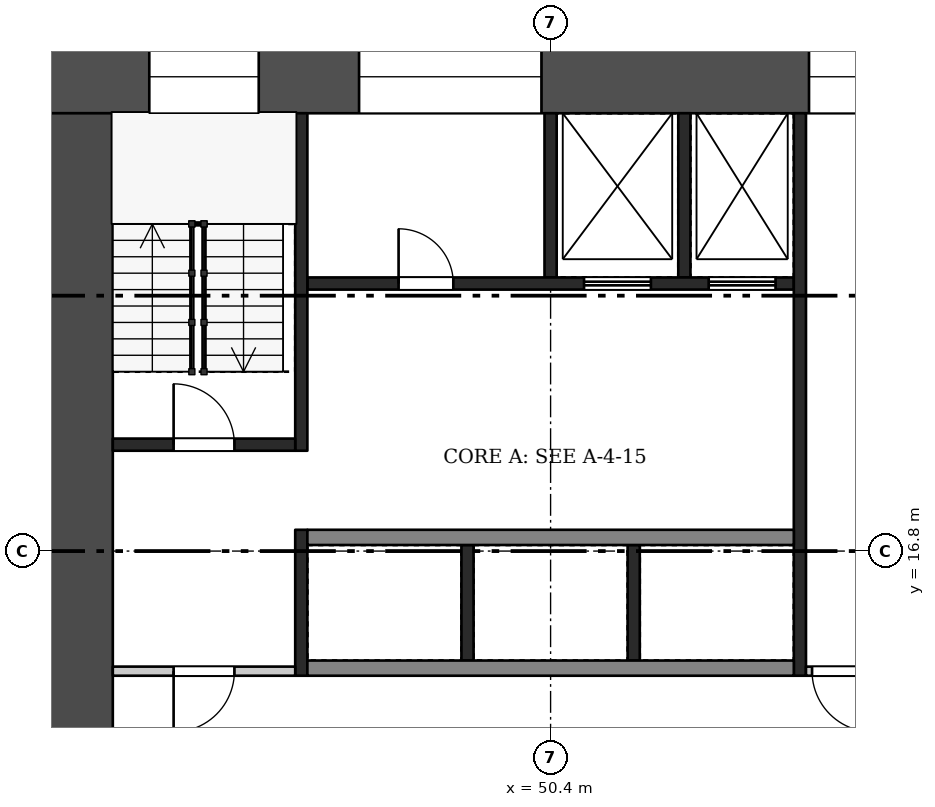
"""IFC4 building model, lengths in metres.
Left out: names, types, materials, properties, quantities, classifications, styles, units other than length and angle.
Written with IfcOpenShell. Run it as: python <this file> out.ifc"""

import sys

from ifc_helpers import new_model, si_unit, direction, frame, frame_2d, origin, place, context, subcontext, project, spatial, rectangle, extrude, element, fill, save


model = new_model("IFC4")
c1 = context("Model", 3, precision=1e-05, world=origin(), true_north=direction((0.0, 1.0)))
c2 = subcontext(c1, "Body", "Model", "MODEL_VIEW")
j1 = project(units=[si_unit("LENGTHUNIT", "METRE"), si_unit("PLANEANGLEUNIT", "RADIAN")], contexts=[c1])
p1 = place(None, origin())
s1 = spatial("IfcSite", under=j1, at=p1, CompositionType="ELEMENT")
p2 = place(p1, origin())
s2 = spatial("IfcBuilding", under=s1, at=p2, CompositionType="ELEMENT")
p3 = place(p2, frame((0.0, 0.0, 81.2)))
s3 = spatial("IfcBuildingStorey", under=s2, at=p3, CompositionType="ELEMENT", Elevation=81.2)
p4 = place(p3, frame((42.0, 24.6, 0.0), z_axis=(0.0, 0.0, 1.0), x_axis=(1.0, 0.0, 0.0)))
e1 = element("IfcWall", 1, at=p4, inside=s3, PredefinedType="SHEAR", context=c2, shape_type="SweptSolid", body=[
    extrude(rectangle(XDim=16.8, YDim=1.2, at=frame_2d((8.4, 0.0))), origin(), (0.0, 0.0, 1.0), 3.22),
])
p5 = place(p4, frame((1.8, 0.0, 0.5)))
e2 = element("IfcOpeningElement", 2, at=p5, cuts=e1, PredefinedType="OPENING", context=c2, shape_type="SweptSolid", body=[
    extrude(rectangle(XDim=1.8, YDim=2.4, at=frame_2d((0.9, 1.2))), frame((0.0, 0.61, 0.0), z_axis=(0.0, -1.0, 0.0), x_axis=(1.0, 0.0, 0.0)), (0.0, 0.0, 1.0), 1.22),
])
p6 = place(p4, frame((5.25, 0.0, 1.6)))
e3 = element("IfcOpeningElement", 3, at=p6, cuts=e1, PredefinedType="OPENING", context=c2, shape_type="SweptSolid", body=[
    extrude(rectangle(XDim=3.0, YDim=1.2, at=frame_2d((1.5, 0.6))), frame((0.0, 0.61, 0.0), z_axis=(0.0, -1.0, 0.0), x_axis=(1.0, 0.0, 0.0)), (0.0, 0.0, 1.0), 1.22),
])
p7 = place(p4, frame((12.65, 0.0, 0.6)))
e4 = element("IfcOpeningElement", 4, at=p7, cuts=e1, PredefinedType="OPENING", context=c2, shape_type="SweptSolid", body=[
    extrude(rectangle(XDim=1.0, YDim=2.1, at=frame_2d((0.5, 1.05))), frame((0.0, 0.61, 0.0), z_axis=(0.0, -1.0, 0.0), x_axis=(1.0, 0.0, 0.0)), (0.0, 0.0, 1.0), 1.22),
])
p8 = place(p4, frame((14.175, 0.0, 1.6)))
e5 = element("IfcOpeningElement", 5, at=p8, cuts=e1, PredefinedType="OPENING", context=c2, shape_type="SweptSolid", body=[
    extrude(rectangle(XDim=1.2, YDim=1.2, at=frame_2d((0.6, 0.6))), frame((0.0, 0.61, 0.0), z_axis=(0.0, -1.0, 0.0), x_axis=(1.0, 0.0, 0.0)), (0.0, 0.0, 1.0), 1.22),
])
p9 = place(p3, frame((42.6, 9.6, 0.0), z_axis=(0.0, 0.0, 1.0), x_axis=(0.0, 1.0, 0.0)))
e6 = element("IfcWall", 6, at=p9, inside=s3, PredefinedType="SHEAR", context=c2, shape_type="SweptSolid", body=[
    extrude(rectangle(XDim=14.4, YDim=1.2, at=frame_2d((7.2, 0.0))), origin(), (0.0, 0.0, 1.0), 3.22),
])
p10 = place(p9, frame((2.1, 0.0, 0.0)))
e7 = element("IfcOpeningElement", 7, at=p10, cuts=e6, PredefinedType="OPENING", context=c2, shape_type="SweptSolid", body=[
    extrude(rectangle(XDim=1.8, YDim=2.1, at=frame_2d((0.9, 1.05))), frame((0.0, 0.61, 0.0), z_axis=(0.0, -1.0, 0.0), x_axis=(1.0, 0.0, 0.0)), (0.0, 0.0, 1.0), 1.22),
])
for number, where, z_axis, x_axis in (
    (8, (49.033, 15.0, 0.0), (0.0, 0.0, 1.0), (0.0, 1.0, 0.0)),
    (9, (51.767, 15.0, 0.0), (0.0, 0.0, 1.0), (0.0, 1.0, 0.0)),
):
    element("IfcWall", number, at=place(p3, frame(where, z_axis=z_axis, x_axis=x_axis)), inside=s3, PredefinedType="SHEAR", context=c2, shape_type="SweptSolid", body=[
        extrude(rectangle(XDim=1.9, YDim=0.2, at=frame_2d((0.95, 0.0))), origin(), (0.0, 0.0, 1.0), 3.22),
    ])
for number, where, z_axis, x_axis in (
    (10, (46.4, 14.875, 0.0), (0.0, 0.0, 1.0), (1.0, 0.0, 0.0)),
    (11, (46.4, 17.025, 0.0), (0.0, 0.0, 1.0), (1.0, 0.0, 0.0)),
):
    element("IfcWall", number, at=place(p3, frame(where, z_axis=z_axis, x_axis=x_axis)), inside=s3, PredefinedType="SHEAR", context=c2, shape_type="SweptSolid", body=[
        extrude(rectangle(XDim=8.0, YDim=0.25, at=frame_2d((4.0, 0.0))), origin(), (0.0, 0.0, 1.0), 3.22),
    ])
for number, where, z_axis, x_axis in (
    (12, (50.4, 21.3, 0.0), (0.0, 0.0, 1.0), (0.0, 1.0, 0.0)),
    (13, (52.6, 21.3, 0.0), (0.0, 0.0, 1.0), (0.0, 1.0, 0.0)),
):
    element("IfcWall", number, at=place(p3, frame(where, z_axis=z_axis, x_axis=x_axis)), inside=s3, PredefinedType="SHEAR", context=c2, shape_type="SweptSolid", body=[
        extrude(rectangle(XDim=2.7, YDim=0.2, at=frame_2d((1.35, 0.0))), origin(), (0.0, 0.0, 1.0), 3.22),
    ])
p11 = place(p3, frame((46.4, 21.2, 0.0), z_axis=(0.0, 0.0, 1.0), x_axis=(1.0, 0.0, 0.0)))
e14 = element("IfcWall", 14, at=p11, inside=s3, PredefinedType="SHEAR", context=c2, shape_type="SweptSolid", body=[
    extrude(rectangle(XDim=8.0, YDim=0.2, at=frame_2d((4.0, 0.0))), origin(), (0.0, 0.0, 1.0), 3.22),
])
p12 = place(p11, frame((1.5, 0.0, 0.0)))
e15 = element("IfcOpeningElement", 15, at=p12, cuts=e14, PredefinedType="OPENING", context=c2, shape_type="SweptSolid", body=[
    extrude(rectangle(XDim=0.9, YDim=2.1, at=frame_2d((0.45, 1.05))), frame((0.0, 0.11, 0.0), z_axis=(0.0, -1.0, 0.0), x_axis=(1.0, 0.0, 0.0)), (0.0, 0.0, 1.0), 0.22),
])
p13 = place(p11, frame((4.55, 0.0, 0.0)))
e16 = element("IfcOpeningElement", 16, at=p13, cuts=e14, PredefinedType="OPENING", context=c2, shape_type="SweptSolid", body=[
    extrude(rectangle(XDim=1.1, YDim=2.1, at=frame_2d((0.55, 1.05))), frame((0.0, 0.11, 0.0), z_axis=(0.0, -1.0, 0.0), x_axis=(1.0, 0.0, 0.0)), (0.0, 0.0, 1.0), 0.22),
])
p14 = place(p11, frame((6.6, 0.0, 0.0)))
e17 = element("IfcOpeningElement", 17, at=p14, cuts=e14, PredefinedType="OPENING", context=c2, shape_type="SweptSolid", body=[
    extrude(rectangle(XDim=1.1, YDim=2.1, at=frame_2d((0.55, 1.05))), frame((0.0, 0.11, 0.0), z_axis=(0.0, -1.0, 0.0), x_axis=(1.0, 0.0, 0.0)), (0.0, 0.0, 1.0), 0.22),
])
p15 = place(p3, frame((46.3, 14.75, 0.0), z_axis=(0.0, 0.0, 1.0), x_axis=(0.0, 1.0, 0.0)))
e18 = element("IfcWall", 18, at=p15, inside=s3, PredefinedType="SHEAR", context=c2, shape_type="SweptSolid", body=[
    extrude(rectangle(XDim=2.4, YDim=0.2, at=frame_2d((1.2, 0.0))), origin(), (0.0, 0.0, 1.0), 3.22),
])
p16 = place(p3, frame((46.3, 18.45, 0.0), z_axis=(0.0, 0.0, 1.0), x_axis=(0.0, 1.0, 0.0)))
e19 = element("IfcWall", 19, at=p16, inside=s3, PredefinedType="SHEAR", context=c2, shape_type="SweptSolid", body=[
    extrude(rectangle(XDim=5.55, YDim=0.2, at=frame_2d((2.775, 0.0))), origin(), (0.0, 0.0, 1.0), 3.22),
])
p17 = place(p3, frame((43.2, 14.825, 0.0), z_axis=(0.0, 0.0, 1.0), x_axis=(1.0, 0.0, 0.0)))
e20 = element("IfcWall", 20, at=p17, inside=s3, PredefinedType="PARTITIONING", context=c2, shape_type="SweptSolid", body=[
    extrude(rectangle(XDim=3.0, YDim=0.15, at=frame_2d((1.5, 0.0))), origin(), (0.0, 0.0, 1.0), 3.22),
])
p18 = place(p17, frame((1.0, 0.0, 0.0)))
e21 = element("IfcOpeningElement", 21, at=p18, cuts=e20, PredefinedType="OPENING", context=c2, shape_type="SweptSolid", body=[
    extrude(rectangle(XDim=1.0, YDim=2.1, at=frame_2d((0.5, 1.05))), frame((0.0, 0.085, 0.0), z_axis=(0.0, -1.0, 0.0), x_axis=(1.0, 0.0, 0.0)), (0.0, 0.0, 1.0), 0.17),
])
p19 = place(p3, frame((43.2, 18.55, 0.0), z_axis=(0.0, 0.0, 1.0), x_axis=(1.0, 0.0, 0.0)))
e22 = element("IfcWall", 22, at=p19, inside=s3, PredefinedType="SHEAR", context=c2, shape_type="SweptSolid", body=[
    extrude(rectangle(XDim=3.0, YDim=0.2, at=frame_2d((1.5, 0.0))), origin(), (0.0, 0.0, 1.0), 3.22),
])
p20 = place(p19, frame((1.0, 0.0, 0.0)))
e23 = element("IfcOpeningElement", 23, at=p20, cuts=e22, PredefinedType="OPENING", context=c2, shape_type="SweptSolid", body=[
    extrude(rectangle(XDim=1.0, YDim=2.1, at=frame_2d((0.5, 1.05))), frame((0.0, 0.11, 0.0), z_axis=(0.0, -1.0, 0.0), x_axis=(1.0, 0.0, 0.0)), (0.0, 0.0, 1.0), 0.22),
])
p21 = place(p3, frame((54.5, 14.75, 0.0), z_axis=(0.0, 0.0, 1.0), x_axis=(0.0, 1.0, 0.0)))
e24 = element("IfcWall", 24, at=p21, inside=s3, PredefinedType="SHEAR", context=c2, shape_type="SweptSolid", body=[
    extrude(rectangle(XDim=9.25, YDim=0.2, at=frame_2d((4.625, 0.0))), origin(), (0.0, 0.0, 1.0), 3.22),
])
p22 = place(p3, frame((54.6, 14.825, 0.0), z_axis=(0.0, 0.0, 1.0), x_axis=(1.0, 0.0, 0.0)))
e25 = element("IfcWall", 25, at=p22, inside=s3, PredefinedType="PARTITIONING", context=c2, shape_type="SweptSolid", body=[
    extrude(rectangle(XDim=3.0, YDim=0.15, at=frame_2d((1.5, 0.0))), origin(), (0.0, 0.0, 1.0), 3.22),
])
p23 = place(p22, frame((0.1, 0.0, 0.0)))
e26 = element("IfcOpeningElement", 26, at=p23, cuts=e25, PredefinedType="OPENING", context=c2, shape_type="SweptSolid", body=[
    extrude(rectangle(XDim=1.0, YDim=2.1, at=frame_2d((0.5, 1.05))), frame((0.0, 0.085, 0.0), z_axis=(0.0, -1.0, 0.0), x_axis=(1.0, 0.0, 0.0)), (0.0, 0.0, 1.0), 0.17),
])
p24 = place(p12, origin())
e27 = element("IfcDoor", 27, at=p24, inside=s3, OperationType="SINGLE_SWING_LEFT", PredefinedType="DOOR", context=c2, shape_type="SweptSolid", body=[
    extrude(rectangle(XDim=0.9, YDim=2.1, at=frame_2d((0.45, 1.05))), frame((0.0, 0.025, 0.0), z_axis=(0.0, -1.0, 0.0), x_axis=(1.0, 0.0, 0.0)), (0.0, 0.0, 1.0), 0.05),
])
fill(e15, e27)
p25 = place(p13, origin())
e28 = element("IfcDoor", 28, at=p25, inside=s3, OperationType="DOUBLE_DOOR_SLIDING", PredefinedType="DOOR", context=c2, shape_type="SweptSolid", body=[
    extrude(rectangle(XDim=1.1, YDim=2.1, at=frame_2d((0.55, 1.05))), frame((0.0, 0.025, 0.0), z_axis=(0.0, -1.0, 0.0), x_axis=(1.0, 0.0, 0.0)), (0.0, 0.0, 1.0), 0.05),
])
fill(e16, e28)
p26 = place(p14, origin())
e29 = element("IfcDoor", 29, at=p26, inside=s3, OperationType="DOUBLE_DOOR_SLIDING", PredefinedType="DOOR", context=c2, shape_type="SweptSolid", body=[
    extrude(rectangle(XDim=1.1, YDim=2.1, at=frame_2d((0.55, 1.05))), frame((0.0, 0.025, 0.0), z_axis=(0.0, -1.0, 0.0), x_axis=(1.0, 0.0, 0.0)), (0.0, 0.0, 1.0), 0.05),
])
fill(e17, e29)
p27 = place(p18, frame((1.0, 0.0, 0.0), z_axis=(0.0, 0.0, 1.0), x_axis=(-1.0, 0.0, 0.0)))
e30 = element("IfcDoor", 30, at=p27, inside=s3, OperationType="SINGLE_SWING_RIGHT", PredefinedType="DOOR", context=c2, shape_type="SweptSolid", body=[
    extrude(rectangle(XDim=1.0, YDim=2.1, at=frame_2d((0.5, 1.05))), frame((0.0, 0.025, 0.0), z_axis=(0.0, -1.0, 0.0), x_axis=(1.0, 0.0, 0.0)), (0.0, 0.0, 1.0), 0.05),
])
fill(e21, e30)
p28 = place(p20, origin())
e31 = element("IfcDoor", 31, at=p28, inside=s3, OperationType="SINGLE_SWING_LEFT", PredefinedType="DOOR", context=c2, shape_type="SweptSolid", body=[
    extrude(rectangle(XDim=1.0, YDim=2.1, at=frame_2d((0.5, 1.05))), frame((0.0, 0.025, 0.0), z_axis=(0.0, -1.0, 0.0), x_axis=(1.0, 0.0, 0.0)), (0.0, 0.0, 1.0), 0.05),
])
fill(e23, e31)
p29 = place(p23, frame((1.0, 0.0, 0.0), z_axis=(0.0, 0.0, 1.0), x_axis=(-1.0, 0.0, 0.0)))
e32 = element("IfcDoor", 32, at=p29, inside=s3, OperationType="SINGLE_SWING_LEFT", PredefinedType="DOOR", context=c2, shape_type="SweptSolid", body=[
    extrude(rectangle(XDim=1.0, YDim=2.1, at=frame_2d((0.5, 1.05))), frame((0.0, 0.025, 0.0), z_axis=(0.0, -1.0, 0.0), x_axis=(1.0, 0.0, 0.0)), (0.0, 0.0, 1.0), 0.05),
])
fill(e26, e32)
p30 = place(p5, origin())
e33 = element("IfcWindow", 33, at=p30, inside=s3, PartitioningType="SINGLE_PANEL", PredefinedType="WINDOW", context=c2, shape_type="SweptSolid", body=[
    extrude(rectangle(XDim=1.8, YDim=2.4, at=frame_2d((0.9, 1.2))), frame((0.0, 0.03, 0.0), z_axis=(0.0, -1.0, 0.0), x_axis=(1.0, 0.0, 0.0)), (0.0, 0.0, 1.0), 0.06),
])
fill(e2, e33)
p31 = place(p6, origin())
e34 = element("IfcWindow", 34, at=p31, inside=s3, PartitioningType="SINGLE_PANEL", PredefinedType="WINDOW", context=c2, shape_type="SweptSolid", body=[
    extrude(rectangle(XDim=3.0, YDim=1.2, at=frame_2d((1.5, 0.6))), frame((0.0, 0.03, 0.0), z_axis=(0.0, -1.0, 0.0), x_axis=(1.0, 0.0, 0.0)), (0.0, 0.0, 1.0), 0.06),
])
fill(e3, e34)
p32 = place(p7, origin())
e35 = element("IfcWindow", 35, at=p32, inside=s3, PartitioningType="SINGLE_PANEL", PredefinedType="WINDOW", context=c2, shape_type="SweptSolid", body=[
    extrude(rectangle(XDim=1.0, YDim=2.1, at=frame_2d((0.5, 1.05))), frame((0.0, 0.03, 0.0), z_axis=(0.0, -1.0, 0.0), x_axis=(1.0, 0.0, 0.0)), (0.0, 0.0, 1.0), 0.06),
])
fill(e4, e35)
save(model, sys.argv[1])
